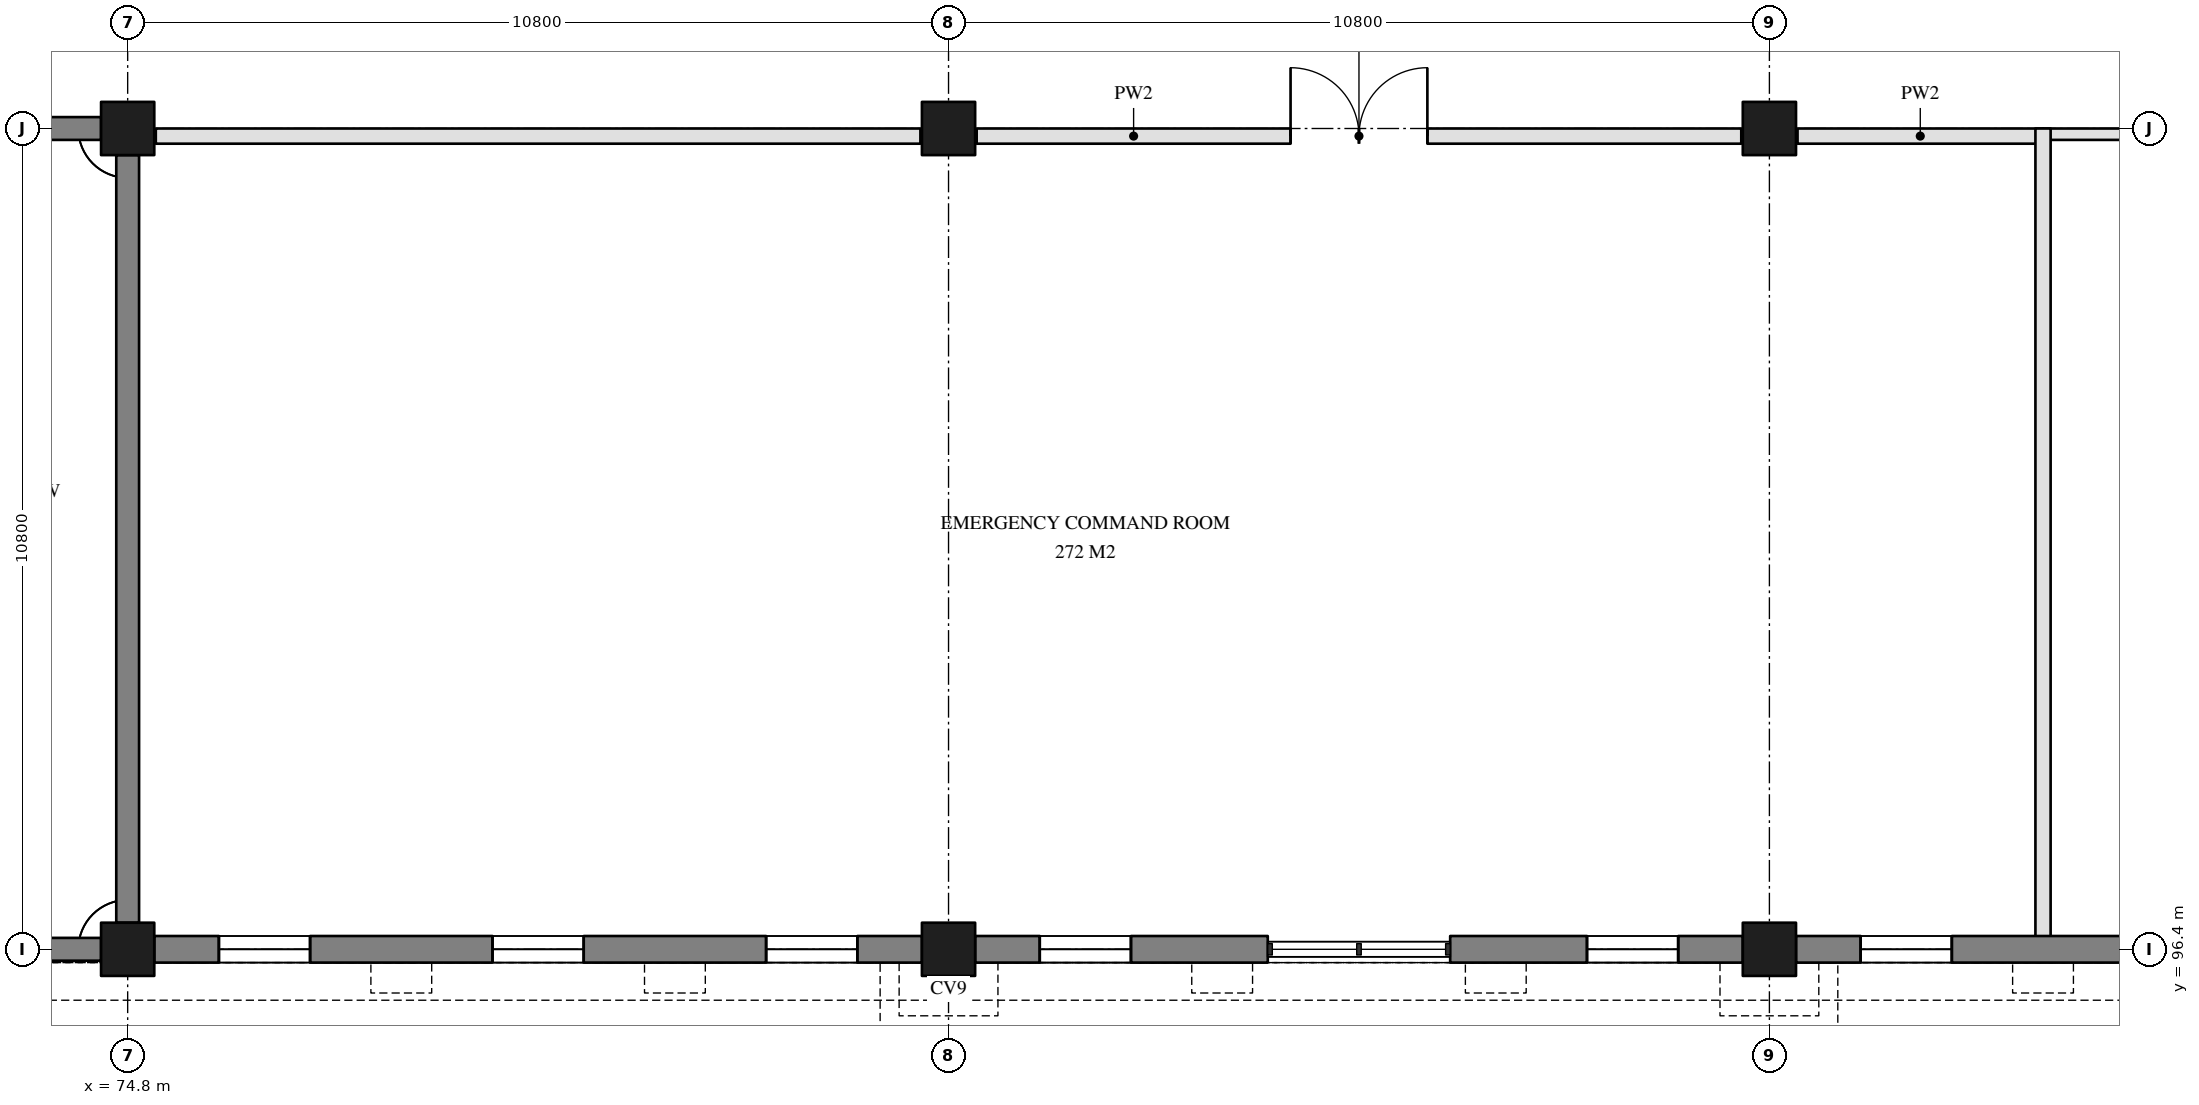
"""IFC4 building model, lengths in metres.
Left out: names, types, materials, properties, quantities, classifications, styles, units other than length and angle.
Written with IfcOpenShell. Run it as: python <this file> out.ifc"""

import sys

from ifc_helpers import new_model, si_unit, direction, frame, frame_2d, origin, origin_2d, place, context, subcontext, project, spatial, rectangle, extrude, element, fill, save


model = new_model("IFC4")
c1 = context("Model", 3, precision=1e-05, world=origin(), true_north=direction((0.0, 1.0)))
c2 = subcontext(c1, "Body", "Model", "MODEL_VIEW")
j1 = project(units=[si_unit("LENGTHUNIT", "METRE"), si_unit("PLANEANGLEUNIT", "RADIAN")], contexts=[c1])
p1 = place(None, origin())
s1 = spatial("IfcSite", under=j1, at=p1, CompositionType="ELEMENT")
p2 = place(p1, origin())
s2 = spatial("IfcBuilding", under=s1, at=p2, CompositionType="ELEMENT")
p3 = place(p2, frame((0.0, 0.0, 24.3)))
s3 = spatial("IfcBuildingStorey", under=s2, at=p3, CompositionType="ELEMENT", Elevation=24.3)
for number, where, z_axis, x_axis in (
    (1, (74.8, 96.4, 0.0), (0.0, 0.0, 1.0), (1.0, 0.0, 0.0)),
    (2, (74.8, 107.2, 0.0), (0.0, 0.0, 1.0), (1.0, 0.0, 0.0)),
    (3, (85.6, 96.4, 0.0), (0.0, 0.0, 1.0), (1.0, 0.0, 0.0)),
    (4, (85.6, 107.2, 0.0), (0.0, 0.0, 1.0), (1.0, 0.0, 0.0)),
    (5, (96.4, 96.4, 0.0), (0.0, 0.0, 1.0), (1.0, 0.0, 0.0)),
    (6, (96.4, 107.2, 0.0), (0.0, 0.0, 1.0), (1.0, 0.0, 0.0)),
):
    element("IfcColumn", number, at=place(p3, frame(where, z_axis=z_axis, x_axis=x_axis)), inside=s3, PredefinedType="COLUMN", context=c2, shape_type="SweptSolid", body=[
        extrude(rectangle(XDim=0.7, YDim=0.7, at=origin_2d()), origin(), (0.0, 0.0, 1.0), 3.9),
    ])
p4 = place(p3, frame((64.35, 96.4, 0.0), z_axis=(0.0, 0.0, 1.0), x_axis=(1.0, 0.0, 0.0)))
e7 = element("IfcWall", 7, at=p4, inside=s3, PredefinedType="SOLIDWALL", context=c2, shape_type="SweptSolid", body=[
    extrude(rectangle(XDim=10.1, YDim=0.3, at=frame_2d((5.05, 0.0))), origin(), (0.0, 0.0, 1.0), 3.9),
])
p5 = place(p3, frame((74.8, 96.75, 0.0), z_axis=(0.0, 0.0, 1.0), x_axis=(0.0, 1.0, 0.0)))
e8 = element("IfcWall", 8, at=p5, inside=s3, PredefinedType="SOLIDWALL", context=c2, shape_type="SweptSolid", body=[
    extrude(rectangle(XDim=10.1, YDim=0.3, at=frame_2d((5.05, 0.0))), origin(), (0.0, 0.0, 1.0), 3.9),
])
p6 = place(p3, frame((74.45, 107.2, 0.0), z_axis=(0.0, 0.0, 1.0), x_axis=(-1.0, 0.0, 0.0)))
e9 = element("IfcWall", 9, at=p6, inside=s3, PredefinedType="SOLIDWALL", context=c2, shape_type="SweptSolid", body=[
    extrude(rectangle(XDim=10.1, YDim=0.3, at=frame_2d((5.05, 0.0))), origin(), (0.0, 0.0, 1.0), 3.9),
])
p7 = place(p6, frame((2.05, 0.0, 0.0)))
e10 = element("IfcOpeningElement", 10, at=p7, cuts=e9, PredefinedType="OPENING", context=c2, shape_type="SweptSolid", body=[
    extrude(rectangle(XDim=1.8, YDim=2.1, at=frame_2d((0.9, 1.05))), frame((0.0, 0.16, 0.0), z_axis=(0.0, -1.0, 0.0), x_axis=(1.0, 0.0, 0.0)), (0.0, 0.0, 1.0), 0.32),
])
p8 = place(p6, frame((4.45, 0.0, 0.0)))
e11 = element("IfcOpeningElement", 11, at=p8, cuts=e9, PredefinedType="OPENING", context=c2, shape_type="SweptSolid", body=[
    extrude(rectangle(XDim=1.0, YDim=2.1, at=frame_2d((0.5, 1.05))), frame((0.0, 0.16, 0.0), z_axis=(0.0, -1.0, 0.0), x_axis=(1.0, 0.0, 0.0)), (0.0, 0.0, 1.0), 0.32),
])
p9 = place(p6, frame((6.85, 0.0, 0.0)))
e12 = element("IfcOpeningElement", 12, at=p9, cuts=e9, PredefinedType="OPENING", context=c2, shape_type="SweptSolid", body=[
    extrude(rectangle(XDim=0.9, YDim=2.1, at=frame_2d((0.45, 1.05))), frame((0.0, 0.16, 0.0), z_axis=(0.0, -1.0, 0.0), x_axis=(1.0, 0.0, 0.0)), (0.0, 0.0, 1.0), 0.32),
])
p10 = place(p3, frame((75.15, 96.4, 0.0), z_axis=(0.0, 0.0, 1.0), x_axis=(1.0, 0.0, 0.0)))
e13 = element("IfcWall", 13, at=p10, inside=s3, PredefinedType="SOLIDWALL", context=c2, shape_type="SweptSolid", body=[
    extrude(rectangle(XDim=10.1, YDim=0.35, at=frame_2d((5.05, 0.0))), origin(), (0.0, 0.0, 1.0), 2.95),
])
p11 = place(p10, frame((0.85, 0.0, 0.9)))
e14 = element("IfcOpeningElement", 14, at=p11, cuts=e13, PredefinedType="OPENING", context=c2, shape_type="SweptSolid", body=[
    extrude(rectangle(XDim=1.2, YDim=1.2, at=frame_2d((0.6, 0.6))), frame((0.0, 0.185, 0.0), z_axis=(0.0, -1.0, 0.0), x_axis=(1.0, 0.0, 0.0)), (0.0, 0.0, 1.0), 0.37),
])
p12 = place(p10, frame((4.45, 0.0, 0.9)))
e15 = element("IfcOpeningElement", 15, at=p12, cuts=e13, PredefinedType="OPENING", context=c2, shape_type="SweptSolid", body=[
    extrude(rectangle(XDim=1.2, YDim=1.2, at=frame_2d((0.6, 0.6))), frame((0.0, 0.185, 0.0), z_axis=(0.0, -1.0, 0.0), x_axis=(1.0, 0.0, 0.0)), (0.0, 0.0, 1.0), 0.37),
])
p13 = place(p10, frame((8.05, 0.0, 0.9)))
e16 = element("IfcOpeningElement", 16, at=p13, cuts=e13, PredefinedType="OPENING", context=c2, shape_type="SweptSolid", body=[
    extrude(rectangle(XDim=1.2, YDim=1.2, at=frame_2d((0.6, 0.6))), frame((0.0, 0.185, 0.0), z_axis=(0.0, -1.0, 0.0), x_axis=(1.0, 0.0, 0.0)), (0.0, 0.0, 1.0), 0.37),
])
p14 = place(p3, frame((85.95, 96.4, 0.0), z_axis=(0.0, 0.0, 1.0), x_axis=(1.0, 0.0, 0.0)))
e17 = element("IfcWall", 17, at=p14, inside=s3, PredefinedType="SOLIDWALL", context=c2, shape_type="SweptSolid", body=[
    extrude(rectangle(XDim=3.85, YDim=0.35, at=frame_2d((1.925, 0.0))), origin(), (0.0, 0.0, 1.0), 2.95),
])
p15 = place(p14, frame((0.85, 0.0, 0.9)))
e18 = element("IfcOpeningElement", 18, at=p15, cuts=e17, PredefinedType="OPENING", context=c2, shape_type="SweptSolid", body=[
    extrude(rectangle(XDim=1.2, YDim=1.2, at=frame_2d((0.6, 0.6))), frame((0.0, 0.185, 0.0), z_axis=(0.0, -1.0, 0.0), x_axis=(1.0, 0.0, 0.0)), (0.0, 0.0, 1.0), 0.37),
])
p16 = place(p3, frame((92.2, 96.4, 0.0), z_axis=(0.0, 0.0, 1.0), x_axis=(1.0, 0.0, 0.0)))
e19 = element("IfcWall", 19, at=p16, inside=s3, PredefinedType="SOLIDWALL", context=c2, shape_type="SweptSolid", body=[
    extrude(rectangle(XDim=3.85, YDim=0.35, at=frame_2d((1.925, 0.0))), origin(), (0.0, 0.0, 1.0), 2.95),
])
p17 = place(p16, frame((1.8, 0.0, 0.9)))
e20 = element("IfcOpeningElement", 20, at=p17, cuts=e19, PredefinedType="OPENING", context=c2, shape_type="SweptSolid", body=[
    extrude(rectangle(XDim=1.2, YDim=1.2, at=frame_2d((0.6, 0.6))), frame((0.0, 0.185, 0.0), z_axis=(0.0, -1.0, 0.0), x_axis=(1.0, 0.0, 0.0)), (0.0, 0.0, 1.0), 0.37),
])
p18 = place(p3, frame((96.75, 96.4, 0.0), z_axis=(0.0, 0.0, 1.0), x_axis=(1.0, 0.0, 0.0)))
e21 = element("IfcWall", 21, at=p18, inside=s3, PredefinedType="SOLIDWALL", context=c2, shape_type="SweptSolid", body=[
    extrude(rectangle(XDim=10.1, YDim=0.35, at=frame_2d((5.05, 0.0))), origin(), (0.0, 0.0, 1.0), 2.95),
])
p19 = place(p18, frame((0.85, 0.0, 0.9)))
e22 = element("IfcOpeningElement", 22, at=p19, cuts=e21, PredefinedType="OPENING", context=c2, shape_type="SweptSolid", body=[
    extrude(rectangle(XDim=1.2, YDim=1.2, at=frame_2d((0.6, 0.6))), frame((0.0, 0.185, 0.0), z_axis=(0.0, -1.0, 0.0), x_axis=(1.0, 0.0, 0.0)), (0.0, 0.0, 1.0), 0.37),
])
p20 = place(p18, frame((4.45, 0.0, 0.9)))
e23 = element("IfcOpeningElement", 23, at=p20, cuts=e21, PredefinedType="OPENING", context=c2, shape_type="SweptSolid", body=[
    extrude(rectangle(XDim=1.2, YDim=1.2, at=frame_2d((0.6, 0.6))), frame((0.0, 0.185, 0.0), z_axis=(0.0, -1.0, 0.0), x_axis=(1.0, 0.0, 0.0)), (0.0, 0.0, 1.0), 0.37),
])
p21 = place(p18, frame((8.05, 0.0, 0.9)))
e24 = element("IfcOpeningElement", 24, at=p21, cuts=e21, PredefinedType="OPENING", context=c2, shape_type="SweptSolid", body=[
    extrude(rectangle(XDim=1.2, YDim=1.2, at=frame_2d((0.6, 0.6))), frame((0.0, 0.185, 0.0), z_axis=(0.0, -1.0, 0.0), x_axis=(1.0, 0.0, 0.0)), (0.0, 0.0, 1.0), 0.37),
])
p22 = place(p3, frame((96.77, 107.1, 0.0), z_axis=(0.0, 0.0, 1.0), x_axis=(1.0, 0.0, 0.0)))
e25 = element("IfcWall", 25, at=p22, inside=s3, PredefinedType="PARTITIONING", context=c2, shape_type="SweptSolid", body=[
    extrude(rectangle(XDim=3.23, YDim=0.2, at=frame_2d((1.615, 0.0))), origin(), (0.0, 0.0, 1.0), 3.75),
])
p23 = place(p3, frame((85.97, 107.1, 0.0), z_axis=(0.0, 0.0, 1.0), x_axis=(1.0, 0.0, 0.0)))
e26 = element("IfcWall", 26, at=p23, inside=s3, PredefinedType="PARTITIONING", context=c2, shape_type="SweptSolid", body=[
    extrude(rectangle(XDim=10.06, YDim=0.2, at=frame_2d((5.03, 0.0))), origin(), (0.0, 0.0, 1.0), 3.75),
])
p24 = place(p23, frame((4.13, 0.0, 0.0)))
e27 = element("IfcOpeningElement", 27, at=p24, cuts=e26, PredefinedType="OPENING", context=c2, shape_type="SweptSolid", body=[
    extrude(rectangle(XDim=1.8, YDim=2.1, at=frame_2d((0.9, 1.05))), frame((0.0, 0.11, 0.0), z_axis=(0.0, -1.0, 0.0), x_axis=(1.0, 0.0, 0.0)), (0.0, 0.0, 1.0), 0.22),
])
p25 = place(p3, frame((75.17, 107.1, 0.0), z_axis=(0.0, 0.0, 1.0), x_axis=(1.0, 0.0, 0.0)))
e28 = element("IfcWall", 28, at=p25, inside=s3, PredefinedType="PARTITIONING", context=c2, shape_type="SweptSolid", body=[
    extrude(rectangle(XDim=10.06, YDim=0.2, at=frame_2d((5.03, 0.0))), origin(), (0.0, 0.0, 1.0), 3.75),
])
p26 = place(p3, frame((100.0, 107.125, 0.0), z_axis=(0.0, 0.0, 1.0), x_axis=(1.0, 0.0, 0.0)))
e29 = element("IfcWall", 29, at=p26, inside=s3, PredefinedType="PARTITIONING", context=c2, shape_type="SweptSolid", body=[
    extrude(rectangle(XDim=6.83, YDim=0.15, at=frame_2d((3.415, 0.0))), origin(), (0.0, 0.0, 1.0), 3.75),
])
p27 = place(p26, frame((2.915, 0.0, 0.0)))
e30 = element("IfcOpeningElement", 30, at=p27, cuts=e29, PredefinedType="OPENING", context=c2, shape_type="SweptSolid", body=[
    extrude(rectangle(XDim=1.0, YDim=2.1, at=frame_2d((0.5, 1.05))), frame((0.0, 0.085, 0.0), z_axis=(0.0, -1.0, 0.0), x_axis=(1.0, 0.0, 0.0)), (0.0, 0.0, 1.0), 0.17),
])
p28 = place(p3, frame((100.0, 96.4, 0.0), z_axis=(0.0, 0.0, 1.0), x_axis=(0.0, 1.0, 0.0)))
e31 = element("IfcWall", 31, at=p28, inside=s3, PredefinedType="PARTITIONING", context=c2, shape_type="SweptSolid", body=[
    extrude(rectangle(XDim=10.8, YDim=0.2, at=frame_2d((5.4, 0.0))), origin(), (0.0, 0.0, 1.0), 2.95),
])
p29 = place(p11, origin())
e32 = element("IfcWindow", 32, at=p29, inside=s3, PartitioningType="SINGLE_PANEL", PredefinedType="WINDOW", context=c2, shape_type="SweptSolid", body=[
    extrude(rectangle(XDim=1.2, YDim=1.2, at=frame_2d((0.6, 0.6))), frame((0.0, 0.03, 0.0), z_axis=(0.0, -1.0, 0.0), x_axis=(1.0, 0.0, 0.0)), (0.0, 0.0, 1.0), 0.06),
])
fill(e14, e32)
p30 = place(p12, origin())
e33 = element("IfcWindow", 33, at=p30, inside=s3, PartitioningType="SINGLE_PANEL", PredefinedType="WINDOW", context=c2, shape_type="SweptSolid", body=[
    extrude(rectangle(XDim=1.2, YDim=1.2, at=frame_2d((0.6, 0.6))), frame((0.0, 0.03, 0.0), z_axis=(0.0, -1.0, 0.0), x_axis=(1.0, 0.0, 0.0)), (0.0, 0.0, 1.0), 0.06),
])
fill(e15, e33)
p31 = place(p13, origin())
e34 = element("IfcWindow", 34, at=p31, inside=s3, PartitioningType="SINGLE_PANEL", PredefinedType="WINDOW", context=c2, shape_type="SweptSolid", body=[
    extrude(rectangle(XDim=1.2, YDim=1.2, at=frame_2d((0.6, 0.6))), frame((0.0, 0.03, 0.0), z_axis=(0.0, -1.0, 0.0), x_axis=(1.0, 0.0, 0.0)), (0.0, 0.0, 1.0), 0.06),
])
fill(e16, e34)
p32 = place(p15, origin())
e35 = element("IfcWindow", 35, at=p32, inside=s3, PartitioningType="SINGLE_PANEL", PredefinedType="WINDOW", context=c2, shape_type="SweptSolid", body=[
    extrude(rectangle(XDim=1.2, YDim=1.2, at=frame_2d((0.6, 0.6))), frame((0.0, 0.03, 0.0), z_axis=(0.0, -1.0, 0.0), x_axis=(1.0, 0.0, 0.0)), (0.0, 0.0, 1.0), 0.06),
])
fill(e18, e35)
p33 = place(p17, origin())
e36 = element("IfcWindow", 36, at=p33, inside=s3, PartitioningType="SINGLE_PANEL", PredefinedType="WINDOW", context=c2, shape_type="SweptSolid", body=[
    extrude(rectangle(XDim=1.2, YDim=1.2, at=frame_2d((0.6, 0.6))), frame((0.0, 0.03, 0.0), z_axis=(0.0, -1.0, 0.0), x_axis=(1.0, 0.0, 0.0)), (0.0, 0.0, 1.0), 0.06),
])
fill(e20, e36)
p34 = place(p19, origin())
e37 = element("IfcWindow", 37, at=p34, inside=s3, PartitioningType="SINGLE_PANEL", PredefinedType="WINDOW", context=c2, shape_type="SweptSolid", body=[
    extrude(rectangle(XDim=1.2, YDim=1.2, at=frame_2d((0.6, 0.6))), frame((0.0, 0.03, 0.0), z_axis=(0.0, -1.0, 0.0), x_axis=(1.0, 0.0, 0.0)), (0.0, 0.0, 1.0), 0.06),
])
fill(e22, e37)
p35 = place(p24, frame((1.8, 0.0, 0.0), z_axis=(0.0, 0.0, 1.0), x_axis=(-1.0, 0.0, 0.0)))
e38 = element("IfcDoor", 38, at=p35, inside=s3, OperationType="DOUBLE_DOOR_DOUBLE_SWING", PredefinedType="DOOR", context=c2, shape_type="SweptSolid", body=[
    extrude(rectangle(XDim=1.8, YDim=2.1, at=frame_2d((0.9, 1.05))), frame((0.0, 0.025, 0.0), z_axis=(0.0, -1.0, 0.0), x_axis=(1.0, 0.0, 0.0)), (0.0, 0.0, 1.0), 0.05),
])
fill(e27, e38)
save(model, sys.argv[1])
